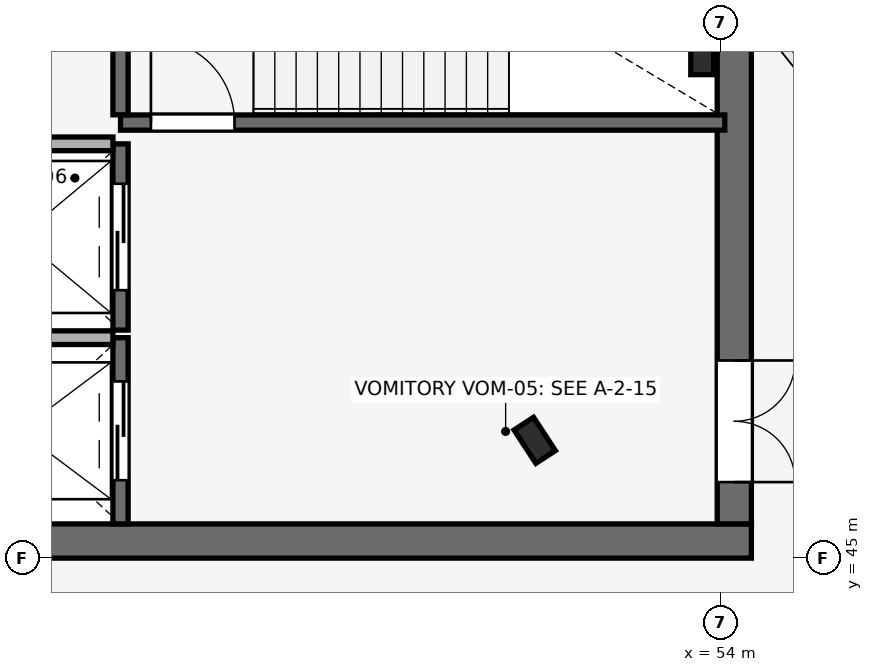
"""IFC4 building model, lengths in metres.
Left out: names, types, materials, properties, quantities, classifications, styles, units other than length and angle.
Written with IfcOpenShell. Run it as: python <this file> out.ifc"""

import sys

from ifc_helpers import new_model, si_unit, direction, frame, frame_2d, origin, origin_2d, place, context, subcontext, project, spatial, rectangle, i_section, extrude, element, fill, save


model = new_model("IFC4")
c1 = context("Model", 3, precision=1e-05, world=origin(), true_north=direction((0.0, 1.0)))
c2 = subcontext(c1, "Body", "Model", "MODEL_VIEW")
j1 = project(units=[si_unit("LENGTHUNIT", "METRE"), si_unit("PLANEANGLEUNIT", "RADIAN")], contexts=[c1])
p1 = place(None, origin())
s1 = spatial("IfcSite", under=j1, at=p1, CompositionType="ELEMENT")
p2 = place(p1, origin())
s2 = spatial("IfcBuilding", under=s1, at=p2, CompositionType="ELEMENT")
p3 = place(p2, frame((0.0, 0.0, 15.0)))
s3 = spatial("IfcBuildingStorey", under=s2, at=p3, CompositionType="ELEMENT", Elevation=15.0)
p4 = place(p3, frame((51.549, 46.55, 0.0), z_axis=(0.0, 0.0, 1.0), x_axis=(-0.836955398099, -0.547271104292, 0.0)))
e1 = element("IfcColumn", 1, at=p4, inside=s3, PredefinedType="COLUMN", context=c2, shape_type="SweptSolid", body=[
    extrude(i_section(OverallWidth=0.306, OverallDepth=0.524, WebThickness=0.021, FlangeThickness=0.04, FilletRadius=0.027, at=origin_2d()), origin(), (0.0, 0.0, 1.0), 4.5),
])
p5 = place(p3, frame((43.0, 45.225, 0.0), z_axis=(0.0, 0.0, 1.0), x_axis=(1.0, 0.0, 0.0)))
e2 = element("IfcWall", 2, at=p5, inside=s3, PredefinedType="SHEAR", context=c2, shape_type="SweptSolid", body=[
    extrude(rectangle(XDim=11.4, YDim=0.45, at=frame_2d((5.7, 0.0))), origin(), (0.0, 0.0, 1.0), 4.5),
])
p6 = place(p3, frame((54.175, 45.45, 0.0), z_axis=(0.0, 0.0, 1.0), x_axis=(0.0, 1.0, 0.0)))
e3 = element("IfcWall", 3, at=p6, inside=s3, PredefinedType="SHEAR", context=c2, shape_type="SweptSolid", body=[
    extrude(rectangle(XDim=9.1, YDim=0.45, at=frame_2d((4.55, 0.0))), origin(), (0.0, 0.0, 1.0), 4.5),
])
p7 = place(p6, frame((0.55, 0.0, 0.0)))
e4 = element("IfcOpeningElement", 4, at=p7, cuts=e3, PredefinedType="OPENING", context=c2, shape_type="SweptSolid", body=[
    extrude(rectangle(XDim=1.6, YDim=2.2, at=frame_2d((0.8, 1.1))), frame((0.0, 0.235, 0.0), z_axis=(0.0, -1.0, 0.0), x_axis=(1.0, 0.0, 0.0)), (0.0, 0.0, 1.0), 0.47),
])
p8 = place(p3, frame((53.752, 51.611, 0.0), z_axis=(0.0, 0.0, 1.0), x_axis=(1.0, 0.0, 0.0)))
e5 = element("IfcColumn", 5, at=p8, inside=s3, PredefinedType="COLUMN", context=c2, shape_type="SweptSolid", body=[
    extrude(i_section(OverallWidth=0.3, OverallDepth=0.5, WebThickness=0.014, FlangeThickness=0.028, FilletRadius=0.027, at=origin_2d()), origin(), (0.0, 0.0, 1.0), 4.5),
])
p9 = place(p3, frame((46.1, 45.45, 0.0), z_axis=(0.0, 0.0, 1.0), x_axis=(0.0, 1.0, 0.0)))
e6 = element("IfcWall", 6, at=p9, inside=s3, PredefinedType="SHEAR", context=c2, shape_type="SweptSolid", body=[
    extrude(rectangle(XDim=2.45, YDim=0.2, at=frame_2d((1.225, 0.0))), origin(), (0.0, 0.0, 1.0), 4.25),
])
p10 = place(p9, frame((0.575, 0.0, 0.0)))
e7 = element("IfcOpeningElement", 7, at=p10, cuts=e6, PredefinedType="OPENING", context=c2, shape_type="SweptSolid", body=[
    extrude(rectangle(XDim=1.3, YDim=2.2, at=frame_2d((0.65, 1.1))), frame((0.0, 0.11, 0.0), z_axis=(0.0, -1.0, 0.0), x_axis=(1.0, 0.0, 0.0)), (0.0, 0.0, 1.0), 0.22),
])
p11 = place(p3, frame((43.55, 47.9, 0.0), z_axis=(0.0, 0.0, 1.0), x_axis=(1.0, 0.0, 0.0)))
e8 = element("IfcWall", 8, at=p11, inside=s3, PredefinedType="PARTITIONING", context=c2, shape_type="SweptSolid", body=[
    extrude(rectangle(XDim=2.45, YDim=0.18, at=frame_2d((1.225, 0.0))), origin(), (0.0, 0.0, 1.0), 4.5),
])
p12 = place(p3, frame((46.1, 48.0, 0.0), z_axis=(0.0, 0.0, 1.0), x_axis=(0.0, 1.0, 0.0)))
e9 = element("IfcWall", 9, at=p12, inside=s3, PredefinedType="SHEAR", context=c2, shape_type="SweptSolid", body=[
    extrude(rectangle(XDim=2.45, YDim=0.2, at=frame_2d((1.225, 0.0))), origin(), (0.0, 0.0, 1.0), 4.25),
])
p13 = place(p12, frame((0.525, 0.0, 0.0)))
e10 = element("IfcOpeningElement", 10, at=p13, cuts=e9, PredefinedType="OPENING", context=c2, shape_type="SweptSolid", body=[
    extrude(rectangle(XDim=1.4, YDim=2.2, at=frame_2d((0.7, 1.1))), frame((0.0, 0.11, 0.0), z_axis=(0.0, -1.0, 0.0), x_axis=(1.0, 0.0, 0.0)), (0.0, 0.0, 1.0), 0.22),
])
p14 = place(p3, frame((43.55, 50.45, 0.0), z_axis=(0.0, 0.0, 1.0), x_axis=(1.0, 0.0, 0.0)))
e11 = element("IfcWall", 11, at=p14, inside=s3, PredefinedType="PARTITIONING", context=c2, shape_type="SweptSolid", body=[
    extrude(rectangle(XDim=2.45, YDim=0.18, at=frame_2d((1.225, 0.0))), origin(), (0.0, 0.0, 1.0), 4.5),
])
p15 = place(p3, frame((46.1, 50.73, 0.0), z_axis=(0.0, 0.0, 1.0), x_axis=(1.0, 0.0, 0.0)))
e12 = element("IfcWall", 12, at=p15, inside=s3, PredefinedType="SHEAR", context=c2, shape_type="SweptSolid", body=[
    extrude(rectangle(XDim=7.95, YDim=0.2, at=frame_2d((3.975, 0.0))), origin(), (0.0, 0.0, 1.0), 4.5),
])
p16 = place(p15, frame((0.4, 0.0, 0.0)))
e13 = element("IfcOpeningElement", 13, at=p16, cuts=e12, PredefinedType="OPENING", context=c2, shape_type="SweptSolid", body=[
    extrude(rectangle(XDim=1.1, YDim=2.15, at=frame_2d((0.55, 1.075))), frame((0.0, 0.11, 0.0), z_axis=(0.0, -1.0, 0.0), x_axis=(1.0, 0.0, 0.0)), (0.0, 0.0, 1.0), 0.22),
])
p17 = place(p3, frame((46.1, 50.832, 0.0), z_axis=(0.0, 0.0, 1.0), x_axis=(0.0, 1.0, 0.0)))
e14 = element("IfcWall", 14, at=p17, inside=s3, PredefinedType="SHEAR", context=c2, shape_type="SweptSolid", body=[
    extrude(rectangle(XDim=3.686, YDim=0.2, at=frame_2d((1.843, 0.0))), origin(), (0.0, 0.0, 1.0), 4.5),
])
p18 = place(p10, origin())
e15 = element("IfcDoor", 15, at=p18, inside=s3, OperationType="DOUBLE_DOOR_SLIDING", PredefinedType="DOOR", context=c2, shape_type="SweptSolid", body=[
    extrude(rectangle(XDim=1.3, YDim=2.2, at=frame_2d((0.65, 1.1))), frame((0.0, 0.025, 0.0), z_axis=(0.0, -1.0, 0.0), x_axis=(1.0, 0.0, 0.0)), (0.0, 0.0, 1.0), 0.05),
])
fill(e7, e15)
p19 = place(p13, origin())
e16 = element("IfcDoor", 16, at=p19, inside=s3, OperationType="DOUBLE_DOOR_SLIDING", PredefinedType="DOOR", context=c2, shape_type="SweptSolid", body=[
    extrude(rectangle(XDim=1.4, YDim=2.2, at=frame_2d((0.7, 1.1))), frame((0.0, 0.025, 0.0), z_axis=(0.0, -1.0, 0.0), x_axis=(1.0, 0.0, 0.0)), (0.0, 0.0, 1.0), 0.05),
])
fill(e10, e16)
p20 = place(p16, frame((1.1, 0.0, 0.0), z_axis=(0.0, 0.0, 1.0), x_axis=(-1.0, 0.0, 0.0)))
e17 = element("IfcDoor", 17, at=p20, inside=s3, OperationType="SINGLE_SWING_RIGHT", PredefinedType="DOOR", context=c2, shape_type="SweptSolid", body=[
    extrude(rectangle(XDim=1.1, YDim=2.15, at=frame_2d((0.55, 1.075))), frame((0.0, 0.025, 0.0), z_axis=(0.0, -1.0, 0.0), x_axis=(1.0, 0.0, 0.0)), (0.0, 0.0, 1.0), 0.05),
])
fill(e13, e17)
p21 = place(p7, frame((1.6, 0.0, 0.0), z_axis=(0.0, 0.0, 1.0), x_axis=(-1.0, 0.0, 0.0)))
e18 = element("IfcDoor", 18, at=p21, inside=s3, OperationType="DOUBLE_DOOR_SINGLE_SWING", PredefinedType="DOOR", context=c2, shape_type="SweptSolid", body=[
    extrude(rectangle(XDim=1.6, YDim=2.2, at=frame_2d((0.8, 1.1))), frame((0.0, 0.025, 0.0), z_axis=(0.0, -1.0, 0.0), x_axis=(1.0, 0.0, 0.0)), (0.0, 0.0, 1.0), 0.05),
])
fill(e4, e18)
save(model, sys.argv[1])
